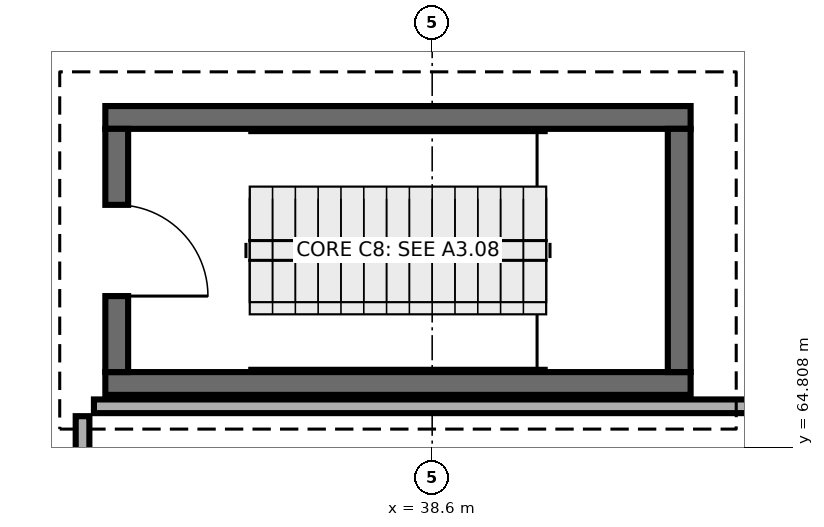
"""IFC4 building model, lengths in metres.
Left out: names, types, materials, properties, quantities, classifications, styles, units other than length and angle.
Written with IfcOpenShell. Run it as: python <this file> out.ifc"""

import sys

from ifc_helpers import new_model, si_unit, direction, frame, frame_2d, origin, place, context, subcontext, project, spatial, rectangle, extrude, element, fill, save


model = new_model("IFC4")
c1 = context("Model", 3, precision=1e-05, world=origin(), true_north=direction((0.0, 1.0)))
c2 = subcontext(c1, "Body", "Model", "MODEL_VIEW")
j1 = project(units=[si_unit("LENGTHUNIT", "METRE"), si_unit("PLANEANGLEUNIT", "RADIAN")], contexts=[c1])
p1 = place(None, origin())
s1 = spatial("IfcSite", under=j1, at=p1, CompositionType="ELEMENT")
p2 = place(p1, origin())
s2 = spatial("IfcBuilding", under=s1, at=p2, CompositionType="ELEMENT")
p3 = place(p2, frame((0.0, 0.0, -5.0)))
s3 = spatial("IfcBuildingStorey", under=s2, at=p3, CompositionType="ELEMENT", Elevation=-5.0)
for number, where, z_axis, x_axis in (
    (1, (34.3, 65.65, 0.0), (0.0, 0.0, 1.0), (1.0, 0.0, 0.0)),
    (2, (42.0, 69.15, 0.0), (0.0, 0.0, 1.0), (-1.0, 0.0, 0.0)),
):
    element("IfcWall", number, at=place(p3, frame(where, z_axis=z_axis, x_axis=x_axis)), inside=s3, PredefinedType="SHEAR", context=c2, shape_type="SweptSolid", body=[
        extrude(rectangle(XDim=7.7, YDim=0.3, at=frame_2d((3.85, 0.0))), origin(), (0.0, 0.0, 1.0), 5.0),
    ])
p4 = place(p3, frame((34.45, 69.0, 0.0), z_axis=(0.0, 0.0, 1.0), x_axis=(0.0, -1.0, 0.0)))
e3 = element("IfcWall", 3, at=p4, inside=s3, PredefinedType="SHEAR", context=c2, shape_type="SweptSolid", body=[
    extrude(rectangle(XDim=3.2, YDim=0.3, at=frame_2d((1.6, 0.0))), origin(), (0.0, 0.0, 1.0), 5.0),
])
p5 = place(p4, frame((1.0, 0.0, 0.0)))
e4 = element("IfcOpeningElement", 4, at=p5, cuts=e3, PredefinedType="OPENING", context=c2, shape_type="SweptSolid", body=[
    extrude(rectangle(XDim=1.2, YDim=2.15, at=frame_2d((0.6, 1.075))), frame((0.0, 0.16, 0.0), z_axis=(0.0, -1.0, 0.0), x_axis=(1.0, 0.0, 0.0)), (0.0, 0.0, 1.0), 0.32),
])
p6 = place(p3, frame((41.85, 65.8, 0.0), z_axis=(0.0, 0.0, 1.0), x_axis=(0.0, 1.0, 0.0)))
e5 = element("IfcWall", 5, at=p6, inside=s3, PredefinedType="SHEAR", context=c2, shape_type="SweptSolid", body=[
    extrude(rectangle(XDim=3.2, YDim=0.3, at=frame_2d((1.6, 0.0))), origin(), (0.0, 0.0, 1.0), 5.0),
])
p7 = place(p3, frame((34.15, 65.35, 0.0), z_axis=(0.0, 0.0, 1.0), x_axis=(1.0, 0.0, 0.0)))
e6 = element("IfcWall", 6, at=p7, inside=s3, PredefinedType="PARTITIONING", context=c2, shape_type="SweptSolid", body=[
    extrude(rectangle(XDim=12.965, YDim=0.18, at=frame_2d((6.482, 0.0))), origin(), (0.0, 0.0, 1.0), 4.7),
])
p8 = place(p3, frame((34.0, 61.75, 0.0), z_axis=(0.0, 0.0, 1.0), x_axis=(0.0, 1.0, 0.0)))
e7 = element("IfcWall", 7, at=p8, inside=s3, PredefinedType="PARTITIONING", context=c2, shape_type="SweptSolid", body=[
    extrude(rectangle(XDim=3.47, YDim=0.18, at=frame_2d((1.735, 0.0))), origin(), (0.0, 0.0, 1.0), 4.7),
])
p9 = place(p8, frame((1.285, 0.0, 0.0)))
e8 = element("IfcOpeningElement", 8, at=p9, cuts=e7, PredefinedType="OPENING", context=c2, shape_type="SweptSolid", body=[
    extrude(rectangle(XDim=0.9, YDim=2.1, at=frame_2d((0.45, 1.05))), frame((0.0, 0.1, 0.0), z_axis=(0.0, -1.0, 0.0), x_axis=(1.0, 0.0, 0.0)), (0.0, 0.0, 1.0), 0.2),
])
p10 = place(p5, origin())
e9 = element("IfcDoor", 9, at=p10, inside=s3, OperationType="SINGLE_SWING_RIGHT", PredefinedType="DOOR", context=c2, shape_type="SweptSolid", body=[
    extrude(rectangle(XDim=1.2, YDim=2.15, at=frame_2d((0.6, 1.075))), frame((0.0, 0.025, 0.0), z_axis=(0.0, -1.0, 0.0), x_axis=(1.0, 0.0, 0.0)), (0.0, 0.0, 1.0), 0.05),
])
fill(e4, e9)
save(model, sys.argv[1])
